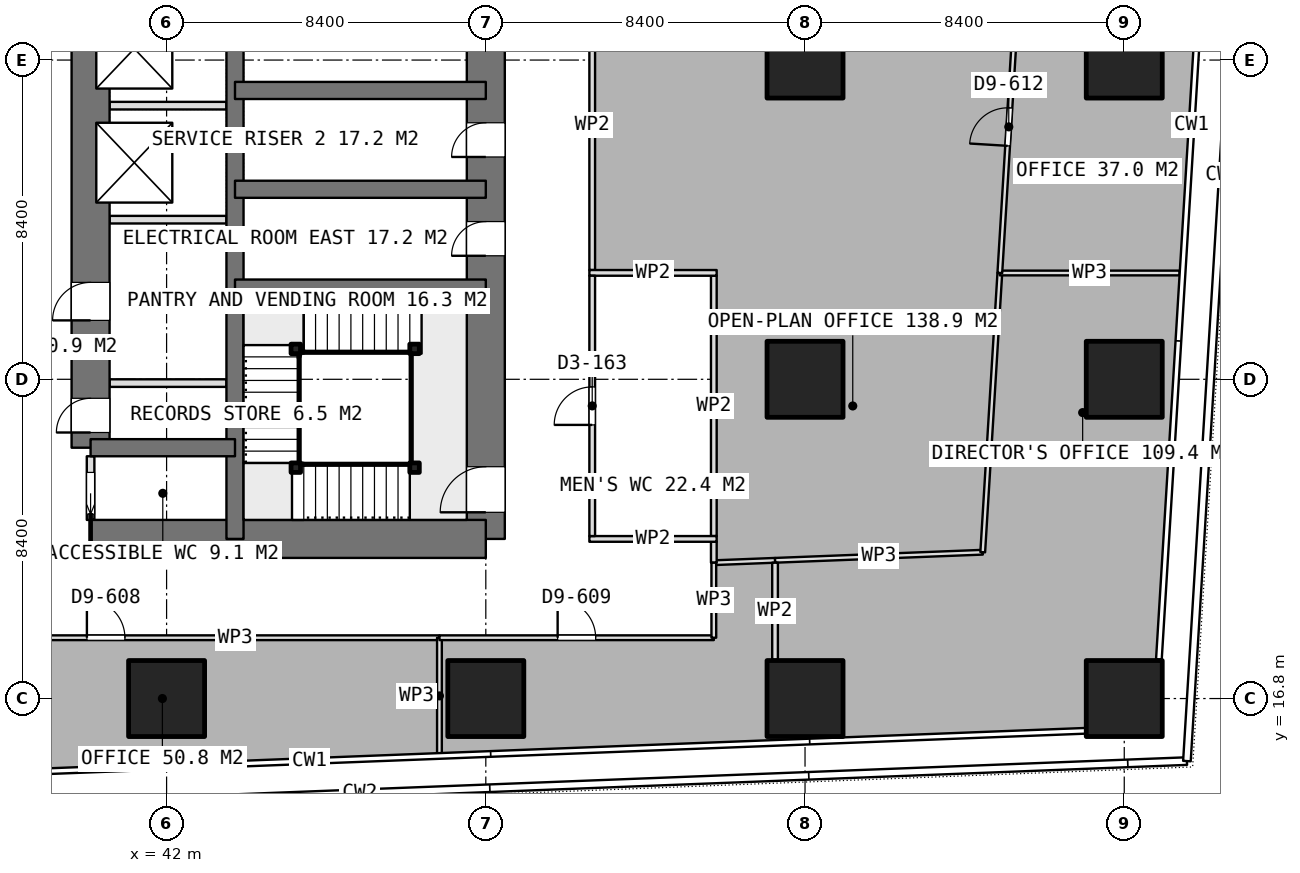
"""IFC4 building model, lengths in metres.
Left out: names, types, materials, properties, quantities, classifications, styles, units other than length and angle.
Written with IfcOpenShell. Run it as: python <this file> out.ifc"""

import sys

from ifc_helpers import new_model, si_unit, direction, frame, frame_2d, origin, origin_2d, place, context, subcontext, project, spatial, rectangle, extrude, element, fill, save


model = new_model("IFC4")
c1 = context("Model", 3, precision=1e-05, world=origin(), true_north=direction((0.0, 1.0)))
c2 = subcontext(c1, "Body", "Model", "MODEL_VIEW")
j1 = project(units=[si_unit("LENGTHUNIT", "METRE"), si_unit("PLANEANGLEUNIT", "RADIAN")], contexts=[c1])
p1 = place(None, origin())
s1 = spatial("IfcSite", under=j1, at=p1, CompositionType="ELEMENT")
p2 = place(p1, origin())
s2 = spatial("IfcBuilding", under=s1, at=p2, CompositionType="ELEMENT")
p3 = place(p2, frame((0.0, 0.0, 151.55)))
s3 = spatial("IfcBuildingStorey", under=s2, at=p3, CompositionType="ELEMENT", Elevation=151.55)
p4 = place(p3, frame((40.0, 21.0, 0.0), z_axis=(0.0, 0.0, 1.0), x_axis=(1.0, 0.0, 0.0)))
e1 = element("IfcWall", 1, at=p4, inside=s3, PredefinedType="SHEAR", context=c2, shape_type="SweptSolid", body=[
    extrude(rectangle(XDim=10.4, YDim=1.0, at=frame_2d((5.2, 0.0))), origin(), (0.0, 0.0, 1.0), 3.75),
])
p5 = place(p3, frame((50.4, 21.0, 0.0), z_axis=(0.0, 0.0, 1.0), x_axis=(0.0, 1.0, 0.0)))
e2 = element("IfcWall", 2, at=p5, inside=s3, PredefinedType="SHEAR", context=c2, shape_type="SweptSolid", body=[
    extrude(rectangle(XDim=25.2, YDim=1.0, at=frame_2d((12.6, 0.0))), origin(), (0.0, 0.0, 1.0), 3.75),
])
p6 = place(p5, frame((16.2, 0.0, 0.0)))
e3 = element("IfcOpeningElement", 3, at=p6, cuts=e2, PredefinedType="OPENING", context=c2, shape_type="SweptSolid", body=[
    extrude(rectangle(XDim=1.2, YDim=2.1, at=frame_2d((0.6, 1.05))), frame((0.0, 0.51, 0.0), z_axis=(0.0, -1.0, 0.0), x_axis=(1.0, 0.0, 0.0)), (0.0, 0.0, 1.0), 1.02),
])
p7 = place(p5, frame((10.05, 0.0, 0.0)))
e4 = element("IfcOpeningElement", 4, at=p7, cuts=e2, PredefinedType="OPENING", context=c2, shape_type="SweptSolid", body=[
    extrude(rectangle(XDim=0.9, YDim=2.1, at=frame_2d((0.45, 1.05))), frame((0.0, 0.51, 0.0), z_axis=(0.0, -1.0, 0.0), x_axis=(1.0, 0.0, 0.0)), (0.0, 0.0, 1.0), 1.02),
])
p8 = place(p5, frame((7.45, 0.0, 0.0)))
e5 = element("IfcOpeningElement", 5, at=p8, cuts=e2, PredefinedType="OPENING", context=c2, shape_type="SweptSolid", body=[
    extrude(rectangle(XDim=0.9, YDim=2.1, at=frame_2d((0.45, 1.05))), frame((0.0, 0.51, 0.0), z_axis=(0.0, -1.0, 0.0), x_axis=(1.0, 0.0, 0.0)), (0.0, 0.0, 1.0), 1.02),
])
p9 = place(p5, frame((0.7, 0.0, 0.0)))
e6 = element("IfcOpeningElement", 6, at=p9, cuts=e2, PredefinedType="OPENING", context=c2, shape_type="SweptSolid", body=[
    extrude(rectangle(XDim=1.2, YDim=2.1, at=frame_2d((0.6, 1.05))), frame((0.0, 0.51, 0.0), z_axis=(0.0, -1.0, 0.0), x_axis=(1.0, 0.0, 0.0)), (0.0, 0.0, 1.0), 1.02),
])
p10 = place(p3, frame((43.8, 21.0, 0.0), z_axis=(0.0, 0.0, 1.0), x_axis=(0.0, 1.0, 0.0)))
e7 = element("IfcWall", 7, at=p10, inside=s3, PredefinedType="SHEAR", context=c2, shape_type="SweptSolid", body=[
    extrude(rectangle(XDim=25.2, YDim=0.45, at=frame_2d((12.6, 0.0))), origin(), (0.0, 0.0, 1.0), 3.75),
])
p11 = place(p3, frame((40.0, 23.4, 0.0), z_axis=(0.0, 0.0, 1.0), x_axis=(0.0, 1.0, 0.0)))
e8 = element("IfcWall", 8, at=p11, inside=s3, PredefinedType="SHEAR", context=c2, shape_type="SweptSolid", body=[
    extrude(rectangle(XDim=18.0, YDim=1.0, at=frame_2d((9.0, 0.0))), origin(), (0.0, 0.0, 1.0), 3.75),
])
p12 = place(p11, frame((0.4, 0.0, 0.0)))
e9 = element("IfcOpeningElement", 9, at=p12, cuts=e8, PredefinedType="OPENING", context=c2, shape_type="SweptSolid", body=[
    extrude(rectangle(XDim=0.9, YDim=2.1, at=frame_2d((0.45, 1.05))), frame((0.0, 0.51, 0.0), z_axis=(0.0, -1.0, 0.0), x_axis=(1.0, 0.0, 0.0)), (0.0, 0.0, 1.0), 1.02),
])
p13 = place(p11, frame((3.35, 0.0, 0.0)))
e10 = element("IfcOpeningElement", 10, at=p13, cuts=e8, PredefinedType="OPENING", context=c2, shape_type="SweptSolid", body=[
    extrude(rectangle(XDim=1.0, YDim=2.1, at=frame_2d((0.5, 1.05))), frame((0.0, 0.51, 0.0), z_axis=(0.0, -1.0, 0.0), x_axis=(1.0, 0.0, 0.0)), (0.0, 0.0, 1.0), 1.02),
])
p14 = place(p3, frame((40.0, 23.4, 0.0), z_axis=(0.0, 0.0, 1.0), x_axis=(1.0, 0.0, 0.0)))
e11 = element("IfcWall", 11, at=p14, inside=s3, PredefinedType="SHEAR", context=c2, shape_type="SweptSolid", body=[
    extrude(rectangle(XDim=3.8, YDim=0.45, at=frame_2d((1.9, 0.0))), origin(), (0.0, 0.0, 1.0), 3.75),
])
for number, where, z_axis, x_axis in (
    (12, (43.8, 27.6, 0.0), (0.0, 0.0, 1.0), (1.0, 0.0, 0.0)),
    (13, (43.8, 30.2, 0.0), (0.0, 0.0, 1.0), (1.0, 0.0, 0.0)),
    (14, (43.8, 32.8, 0.0), (0.0, 0.0, 1.0), (1.0, 0.0, 0.0)),
):
    element("IfcWall", number, at=place(p3, frame(where, z_axis=z_axis, x_axis=x_axis)), inside=s3, PredefinedType="SHEAR", context=c2, shape_type="SweptSolid", body=[
        extrude(rectangle(XDim=6.6, YDim=0.45, at=frame_2d((3.3, 0.0))), origin(), (0.0, 0.0, 1.0), 3.75),
    ])
for number, where, z_axis, x_axis in (
    (15, (42.0, 16.8, 0.0), (0.0, 0.0, 1.0), (1.0, 0.0, 0.0)),
    (16, (50.4, 16.8, 0.0), (0.0, 0.0, 1.0), (1.0, 0.0, 0.0)),
    (17, (58.8, 16.8, 0.0), (0.0, 0.0, 1.0), (1.0, 0.0, 0.0)),
    (18, (58.8, 25.2, 0.0), (0.0, 0.0, 1.0), (1.0, 0.0, 0.0)),
    (19, (58.8, 33.6, 0.0), (0.0, 0.0, 1.0), (1.0, 0.0, 0.0)),
    (20, (67.2, 16.8, 0.0), (0.0, 0.0, 1.0), (1.0, 0.0, 0.0)),
    (21, (67.2, 25.2, 0.0), (0.0, 0.0, 1.0), (1.0, 0.0, 0.0)),
    (22, (67.2, 33.6, 0.0), (0.0, 0.0, 1.0), (1.0, 0.0, 0.0)),
):
    element("IfcColumn", number, at=place(p3, frame(where, z_axis=z_axis, x_axis=x_axis)), inside=s3, PredefinedType="COLUMN", context=c2, shape_type="SweptSolid", body=[
        extrude(rectangle(XDim=2.0, YDim=2.0, at=origin_2d()), origin(), (0.0, 0.0, 1.0), 3.75),
    ])
for number, where, z_axis, x_axis in (
    (23, (40.5, 29.4, 0.0), (0.0, 0.0, 1.0), (1.0, 0.0, 0.0)),
    (24, (40.5, 32.4, 0.0), (0.0, 0.0, 1.0), (1.0, 0.0, 0.0)),
):
    element("IfcWall", number, at=place(p3, frame(where, z_axis=z_axis, x_axis=x_axis)), inside=s3, PredefinedType="PARTITIONING", context=c2, shape_type="SweptSolid", body=[
        extrude(rectangle(XDim=3.075, YDim=0.2, at=frame_2d((1.538, 0.0))), origin(), (0.0, 0.0, 1.0), 3.5),
    ])
p15 = place(p3, frame((40.0, 21.5, 0.0), z_axis=(0.0, 0.0, 1.0), x_axis=(0.0, 1.0, 0.0)))
e25 = element("IfcWall", 25, at=p15, inside=s3, PredefinedType="PARTITIONING", context=c2, shape_type="SweptSolid", body=[
    extrude(rectangle(XDim=1.675, YDim=0.2, at=frame_2d((0.837, 0.0))), origin(), (0.0, 0.0, 1.0), 3.5),
])
p16 = place(p15, frame((0.15, 0.0, 0.0)))
e26 = element("IfcOpeningElement", 26, at=p16, cuts=e25, PredefinedType="OPENING", context=c2, shape_type="SweptSolid", body=[
    extrude(rectangle(XDim=1.1, YDim=2.1, at=frame_2d((0.55, 1.05))), frame((0.0, 0.11, 0.0), z_axis=(0.0, -1.0, 0.0), x_axis=(1.0, 0.0, 0.0)), (0.0, 0.0, 1.0), 0.22),
])
p17 = place(p3, frame((40.5, 25.1, 0.0), z_axis=(0.0, 0.0, 1.0), x_axis=(1.0, 0.0, 0.0)))
e27 = element("IfcWall", 27, at=p17, inside=s3, PredefinedType="PARTITIONING", context=c2, shape_type="SweptSolid", body=[
    extrude(rectangle(XDim=3.075, YDim=0.2, at=frame_2d((1.538, 0.0))), origin(), (0.0, 0.0, 1.0), 3.5),
])
for number, where, z_axis, x_axis in (
    (28, (53.125, 21.0, 0.0), (0.0, 0.0, 1.0), (1.0, 0.0, 0.0)),
    (29, (53.125, 28.0, 0.0), (0.0, 0.0, 1.0), (1.0, 0.0, 0.0)),
):
    element("IfcWall", number, at=place(p3, frame(where, z_axis=z_axis, x_axis=x_axis)), inside=s3, PredefinedType="PARTITIONING", context=c2, shape_type="SweptSolid", body=[
        extrude(rectangle(XDim=3.35, YDim=0.15, at=frame_2d((1.675, 0.0))), origin(), (0.0, 0.0, 1.0), 3.5),
    ])
p18 = place(p3, frame((53.2, 21.075, 0.0), z_axis=(0.0, 0.0, 1.0), x_axis=(0.0, 1.0, 0.0)))
e30 = element("IfcWall", 30, at=p18, inside=s3, PredefinedType="PARTITIONING", context=c2, shape_type="SweptSolid", body=[
    extrude(rectangle(XDim=6.85, YDim=0.15, at=frame_2d((3.425, 0.0))), origin(), (0.0, 0.0, 1.0), 3.5),
])
p19 = place(p18, frame((2.925, 0.0, 0.0)))
e31 = element("IfcOpeningElement", 31, at=p19, cuts=e30, PredefinedType="OPENING", context=c2, shape_type="SweptSolid", body=[
    extrude(rectangle(XDim=1.0, YDim=2.1, at=frame_2d((0.5, 1.05))), frame((0.0, 0.085, 0.0), z_axis=(0.0, -1.0, 0.0), x_axis=(1.0, 0.0, 0.0)), (0.0, 0.0, 1.0), 0.17),
])
p20 = place(p3, frame((56.4, 21.075, 0.0), z_axis=(0.0, 0.0, 1.0), x_axis=(0.0, 1.0, 0.0)))
e32 = element("IfcWall", 32, at=p20, inside=s3, PredefinedType="PARTITIONING", context=c2, shape_type="SweptSolid", body=[
    extrude(rectangle(XDim=6.85, YDim=0.15, at=frame_2d((3.425, 0.0))), origin(), (0.0, 0.0, 1.0), 3.5),
])
p21 = place(p3, frame((56.4, 20.374, 0.0), z_axis=(0.0, 0.0, 1.0), x_axis=(0.999237517487, 0.039043355976, 0.0)))
e33 = element("IfcWall", 33, at=p21, inside=s3, PredefinedType="PARTITIONING", context=c2, shape_type="SweptSolid", body=[
    extrude(rectangle(XDim=1.613, YDim=0.125, at=frame_2d((0.807, 0.0))), origin(), (0.0, 0.0, 1.0), 3.5),
])
p22 = place(p3, frame((58.012, 20.437, 0.0), z_axis=(0.0, 0.0, 1.0), x_axis=(0.999241859152, 0.038932080836, 0.0)))
e34 = element("IfcWall", 34, at=p22, inside=s3, PredefinedType="PARTITIONING", context=c2, shape_type="SweptSolid", body=[
    extrude(rectangle(XDim=5.468, YDim=0.125, at=frame_2d((2.734, 0.0))), origin(), (0.0, 0.0, 1.0), 3.5),
])
p23 = place(p3, frame((63.476, 20.65, 0.0), z_axis=(0.0, 0.0, 1.0), x_axis=(0.061126922055, 0.998130001252, 0.0)))
e35 = element("IfcWall", 35, at=p23, inside=s3, PredefinedType="PARTITIONING", context=c2, shape_type="SweptSolid", body=[
    extrude(rectangle(XDim=7.361, YDim=0.125, at=frame_2d((3.68, 0.0))), origin(), (0.0, 0.0, 1.0), 3.5),
])
p24 = place(p3, frame((63.926, 27.997, 0.0), z_axis=(0.0, 0.0, 1.0), x_axis=(1.0, 0.0, 0.0)))
e36 = element("IfcWall", 36, at=p24, inside=s3, PredefinedType="PARTITIONING", context=c2, shape_type="SweptSolid", body=[
    extrude(rectangle(XDim=4.729, YDim=0.125, at=frame_2d((2.365, 0.0))), origin(), (0.0, 0.0, 1.0), 3.5),
])
p25 = place(p3, frame((49.18, 15.339, 0.0), z_axis=(0.0, 0.0, 1.0), x_axis=(0.0, 1.0, 0.0)))
e37 = element("IfcWall", 37, at=p25, inside=s3, PredefinedType="PARTITIONING", context=c2, shape_type="SweptSolid", body=[
    extrude(rectangle(XDim=3.061, YDim=0.125, at=frame_2d((1.53, 0.0))), origin(), (0.0, 0.0, 1.0), 3.5),
])
p26 = place(p3, frame((49.18, 18.4, 0.0), z_axis=(0.0, 0.0, 1.0), x_axis=(1.0, 0.0, 0.0)))
e38 = element("IfcWall", 38, at=p26, inside=s3, PredefinedType="PARTITIONING", context=c2, shape_type="SweptSolid", body=[
    extrude(rectangle(XDim=7.22, YDim=0.125, at=frame_2d((3.61, 0.0))), origin(), (0.0, 0.0, 1.0), 3.5),
])
p27 = place(p26, frame((3.11, 0.0, 0.0)))
e39 = element("IfcOpeningElement", 39, at=p27, cuts=e38, PredefinedType="OPENING", context=c2, shape_type="SweptSolid", body=[
    extrude(rectangle(XDim=1.0, YDim=2.1, at=frame_2d((0.5, 1.05))), frame((0.0, 0.073, 0.0), z_axis=(0.0, -1.0, 0.0), x_axis=(1.0, 0.0, 0.0)), (0.0, 0.0, 1.0), 0.145),
])
p28 = place(p3, frame((56.4, 18.4, 0.0), z_axis=(0.0, 0.0, 1.0), x_axis=(0.0, 1.0, 0.0)))
e40 = element("IfcWall", 40, at=p28, inside=s3, PredefinedType="PARTITIONING", context=c2, shape_type="SweptSolid", body=[
    extrude(rectangle(XDim=1.974, YDim=0.125, at=frame_2d((0.987, 0.0))), origin(), (0.0, 0.0, 1.0), 3.5),
])
p29 = place(p3, frame((63.926, 27.998, 0.0), z_axis=(0.0, 0.0, 1.0), x_axis=(0.061142930486, 0.998129020744, 0.0)))
e41 = element("IfcWall", 41, at=p29, inside=s3, PredefinedType="PARTITIONING", context=c2, shape_type="SweptSolid", body=[
    extrude(rectangle(XDim=7.702, YDim=0.125, at=frame_2d((3.851, 0.0))), origin(), (0.0, 0.0, 1.0), 3.5),
])
p30 = place(p29, frame((3.351, 0.0, 0.0)))
e42 = element("IfcOpeningElement", 42, at=p30, cuts=e41, PredefinedType="OPENING", context=c2, shape_type="SweptSolid", body=[
    extrude(rectangle(XDim=1.0, YDim=2.1, at=frame_2d((0.5, 1.05))), frame((0.0, 0.073, 0.0), z_axis=(0.0, -1.0, 0.0), x_axis=(1.0, 0.0, 0.0)), (0.0, 0.0, 1.0), 0.145),
])
p31 = place(p3, frame((33.826, 18.4, 0.0), z_axis=(0.0, 0.0, 1.0), x_axis=(1.0, 0.0, 0.0)))
e43 = element("IfcWall", 43, at=p31, inside=s3, PredefinedType="PARTITIONING", context=c2, shape_type="SweptSolid", body=[
    extrude(rectangle(XDim=15.353, YDim=0.125, at=frame_2d((7.677, 0.0))), origin(), (0.0, 0.0, 1.0), 3.5),
])
p32 = place(p31, frame((6.077, 0.0, 0.0)))
e44 = element("IfcOpeningElement", 44, at=p32, cuts=e43, PredefinedType="OPENING", context=c2, shape_type="SweptSolid", body=[
    extrude(rectangle(XDim=1.0, YDim=2.1, at=frame_2d((0.5, 1.05))), frame((0.0, 0.073, 0.0), z_axis=(0.0, -1.0, 0.0), x_axis=(1.0, 0.0, 0.0)), (0.0, 0.0, 1.0), 0.145),
])
p33 = place(p3, frame((58.011, 20.374, 0.0), z_axis=(0.0, 0.0, 1.0), x_axis=(0.0, -1.0, 0.0)))
e45 = element("IfcWall", 45, at=p33, inside=s3, PredefinedType="PARTITIONING", context=c2, shape_type="SweptSolid", body=[
    extrude(rectangle(XDim=2.554, YDim=0.15, at=frame_2d((1.277, 0.0))), origin(), (0.0, 0.0, 1.0), 3.5),
])
p34 = place(p3, frame((56.4, 20.374, 0.0), z_axis=(0.0, 0.0, 1.0), x_axis=(0.0, 1.0, 0.0)))
e46 = element("IfcWall", 46, at=p34, inside=s3, PredefinedType="PARTITIONING", context=c2, shape_type="SweptSolid", body=[
    extrude(rectangle(XDim=0.551, YDim=0.15, at=frame_2d((0.275, 0.0))), origin(), (0.0, 0.0, 1.0), 3.5),
])
p35 = place(p3, frame((53.2, 28.075, 0.0), z_axis=(0.0, 0.0, 1.0), x_axis=(0.0, 1.0, 0.0)))
e47 = element("IfcWall", 47, at=p35, inside=s3, PredefinedType="PARTITIONING", context=c2, shape_type="SweptSolid", body=[
    extrude(rectangle(XDim=7.615, YDim=0.15, at=frame_2d((3.808, 0.0))), origin(), (0.0, 0.0, 1.0), 3.5),
])
for number, where, z_axis, x_axis in (
    (48, (48.525, 22.875, 0.0), (0.0, 0.0, 1.0), (1.0, 0.0, 0.0)),
    (49, (45.4, 22.875, 0.0), (0.0, 0.0, 1.0), (1.0, 0.0, 0.0)),
    (50, (45.4, 26.0, 0.0), (0.0, 0.0, 1.0), (1.0, 0.0, 0.0)),
    (51, (48.525, 26.0, 0.0), (0.0, 0.0, 1.0), (1.0, 0.0, 0.0)),
):
    element("IfcColumn", number, at=place(p3, frame(where, z_axis=z_axis, x_axis=x_axis)), inside=s3, PredefinedType="COLUMN", context=c2, shape_type="SweptSolid", body=[
        extrude(rectangle(XDim=0.25, YDim=0.25, at=origin_2d()), origin(), (0.0, 0.0, 1.0), 3.75),
    ])
p36 = place(p7, origin())
e52 = element("IfcDoor", 52, at=p36, inside=s3, OperationType="SINGLE_SWING_LEFT", PredefinedType="DOOR", context=c2, shape_type="SweptSolid", body=[
    extrude(rectangle(XDim=0.9, YDim=2.1, at=frame_2d((0.45, 1.05))), frame((0.0, 0.025, 0.0), z_axis=(0.0, -1.0, 0.0), x_axis=(1.0, 0.0, 0.0)), (0.0, 0.0, 1.0), 0.05),
])
fill(e4, e52)
p37 = place(p8, origin())
e53 = element("IfcDoor", 53, at=p37, inside=s3, OperationType="SINGLE_SWING_LEFT", PredefinedType="DOOR", context=c2, shape_type="SweptSolid", body=[
    extrude(rectangle(XDim=0.9, YDim=2.1, at=frame_2d((0.45, 1.05))), frame((0.0, 0.025, 0.0), z_axis=(0.0, -1.0, 0.0), x_axis=(1.0, 0.0, 0.0)), (0.0, 0.0, 1.0), 0.05),
])
fill(e5, e53)
p38 = place(p16, origin())
e54 = element("IfcDoor", 54, at=p38, inside=s3, OperationType="SLIDING_TO_LEFT", PredefinedType="DOOR", context=c2, shape_type="SweptSolid", body=[
    extrude(rectangle(XDim=1.1, YDim=2.1, at=frame_2d((0.55, 1.05))), frame((0.0, 0.025, 0.0), z_axis=(0.0, -1.0, 0.0), x_axis=(1.0, 0.0, 0.0)), (0.0, 0.0, 1.0), 0.05),
])
fill(e26, e54)
p39 = place(p12, origin())
e55 = element("IfcDoor", 55, at=p39, inside=s3, OperationType="SINGLE_SWING_LEFT", PredefinedType="DOOR", context=c2, shape_type="SweptSolid", body=[
    extrude(rectangle(XDim=0.9, YDim=2.1, at=frame_2d((0.45, 1.05))), frame((0.0, 0.025, 0.0), z_axis=(0.0, -1.0, 0.0), x_axis=(1.0, 0.0, 0.0)), (0.0, 0.0, 1.0), 0.05),
])
fill(e9, e55)
p40 = place(p13, origin())
e56 = element("IfcDoor", 56, at=p40, inside=s3, OperationType="SINGLE_SWING_LEFT", PredefinedType="DOOR", context=c2, shape_type="SweptSolid", body=[
    extrude(rectangle(XDim=1.0, YDim=2.1, at=frame_2d((0.5, 1.05))), frame((0.0, 0.025, 0.0), z_axis=(0.0, -1.0, 0.0), x_axis=(1.0, 0.0, 0.0)), (0.0, 0.0, 1.0), 0.05),
])
fill(e10, e56)
p41 = place(p19, origin())
e57 = element("IfcDoor", 57, at=p41, inside=s3, OperationType="SINGLE_SWING_LEFT", PredefinedType="DOOR", context=c2, shape_type="SweptSolid", body=[
    extrude(rectangle(XDim=1.0, YDim=2.1, at=frame_2d((0.5, 1.05))), frame((0.0, 0.025, 0.0), z_axis=(0.0, -1.0, 0.0), x_axis=(1.0, 0.0, 0.0)), (0.0, 0.0, 1.0), 0.05),
])
fill(e31, e57)
p42 = place(p27, origin())
e58 = element("IfcDoor", 58, at=p42, inside=s3, OperationType="SINGLE_SWING_LEFT", PredefinedType="DOOR", context=c2, shape_type="SweptSolid", body=[
    extrude(rectangle(XDim=1.0, YDim=2.1, at=frame_2d((0.5, 1.05))), frame((0.0, 0.025, 0.0), z_axis=(0.0, -1.0, 0.0), x_axis=(1.0, 0.0, 0.0)), (0.0, 0.0, 1.0), 0.05),
])
fill(e39, e58)
p43 = place(p30, origin())
e59 = element("IfcDoor", 59, at=p43, inside=s3, OperationType="SINGLE_SWING_LEFT", PredefinedType="DOOR", context=c2, shape_type="SweptSolid", body=[
    extrude(rectangle(XDim=1.0, YDim=2.1, at=frame_2d((0.5, 1.05))), frame((0.0, 0.025, 0.0), z_axis=(0.0, -1.0, 0.0), x_axis=(1.0, 0.0, 0.0)), (0.0, 0.0, 1.0), 0.05),
])
fill(e42, e59)
p44 = place(p32, origin())
e60 = element("IfcDoor", 60, at=p44, inside=s3, OperationType="SINGLE_SWING_LEFT", PredefinedType="DOOR", context=c2, shape_type="SweptSolid", body=[
    extrude(rectangle(XDim=1.0, YDim=2.1, at=frame_2d((0.5, 1.05))), frame((0.0, 0.025, 0.0), z_axis=(0.0, -1.0, 0.0), x_axis=(1.0, 0.0, 0.0)), (0.0, 0.0, 1.0), 0.05),
])
fill(e44, e60)
p45 = place(p9, origin())
e61 = element("IfcDoor", 61, at=p45, inside=s3, OperationType="SINGLE_SWING_RIGHT", PredefinedType="DOOR", context=c2, shape_type="SweptSolid", body=[
    extrude(rectangle(XDim=1.2, YDim=2.1, at=frame_2d((0.6, 1.05))), frame((0.0, 0.025, 0.0), z_axis=(0.0, -1.0, 0.0), x_axis=(1.0, 0.0, 0.0)), (0.0, 0.0, 1.0), 0.05),
])
fill(e6, e61)
save(model, sys.argv[1])
